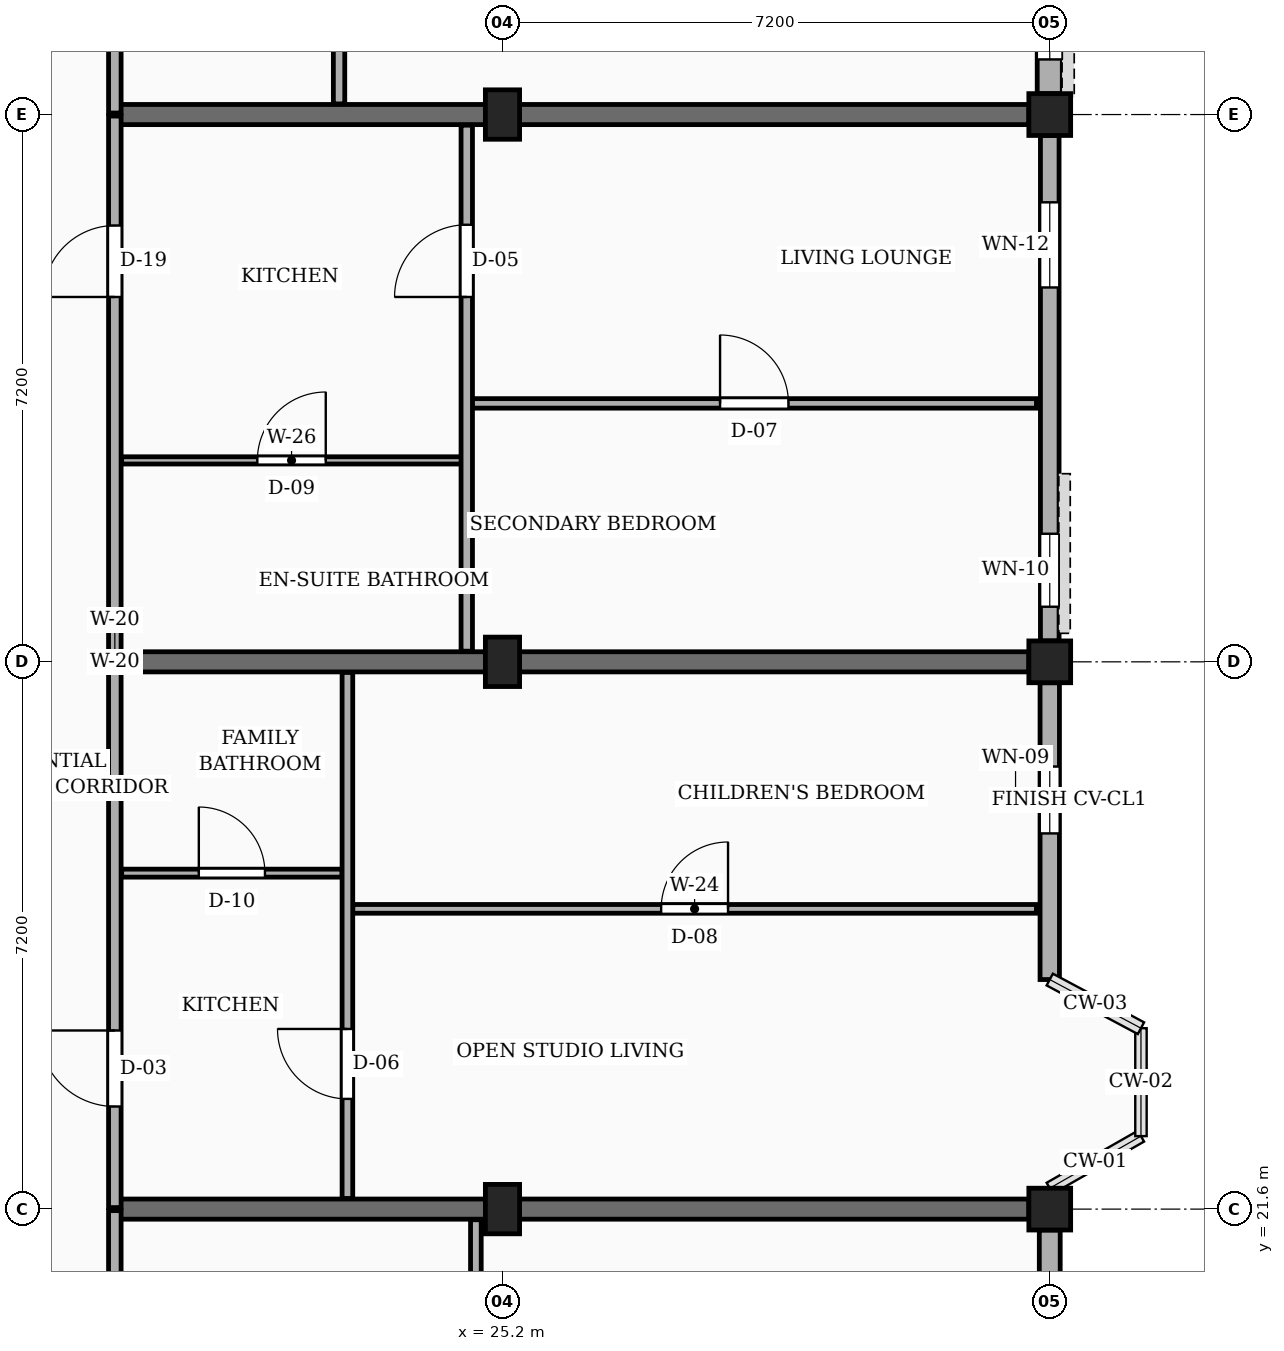
"""IFC4 building model, lengths in metres.
Left out: names, types, materials, properties, quantities, classifications, styles, units other than length and angle.
Written with IfcOpenShell. Run it as: python <this file> out.ifc"""

import sys

from ifc_helpers import new_model, si_unit, direction, frame, frame_2d, origin, origin_2d, place, context, subcontext, project, spatial, rectangle, extrude, element, fill, save


model = new_model("IFC4")
c1 = context("Model", 3, precision=1e-05, world=origin(), true_north=direction((0.0, 1.0)))
c2 = subcontext(c1, "Body", "Model", "MODEL_VIEW")
j1 = project(units=[si_unit("LENGTHUNIT", "METRE"), si_unit("PLANEANGLEUNIT", "RADIAN")], contexts=[c1])
p1 = place(None, origin())
s1 = spatial("IfcSite", under=j1, at=p1, CompositionType="ELEMENT")
p2 = place(p1, origin())
s2 = spatial("IfcBuilding", under=s1, at=p2, CompositionType="ELEMENT")
p3 = place(p2, frame((0.0, 0.0, 10.8)))
s3 = spatial("IfcBuildingStorey", under=s2, at=p3, CompositionType="ELEMENT", Elevation=10.8)
for number, where, z_axis, x_axis in (
    (1, (25.2, 21.6, 0.0), (0.0, 0.0, 1.0), (1.0, 0.0, 0.0)),
    (2, (25.2, 28.8, 0.0), (0.0, 0.0, 1.0), (1.0, 0.0, 0.0)),
    (3, (25.2, 36.0, 0.0), (0.0, 0.0, 1.0), (1.0, 0.0, 0.0)),
):
    element("IfcColumn", number, at=place(p3, frame(where, z_axis=z_axis, x_axis=x_axis)), inside=s3, PredefinedType="COLUMN", context=c2, shape_type="SweptSolid", body=[
        extrude(rectangle(XDim=0.45, YDim=0.65, at=origin_2d()), origin(), (0.0, 0.0, 1.0), 3.15),
    ])
for number, where, z_axis, x_axis in (
    (4, (32.4, 21.6, 0.0), (0.0, 0.0, 1.0), (1.0, 0.0, 0.0)),
    (5, (32.4, 28.8, 0.0), (0.0, 0.0, 1.0), (1.0, 0.0, 0.0)),
    (6, (32.4, 36.0, 0.0), (0.0, 0.0, 1.0), (1.0, 0.0, 0.0)),
):
    element("IfcColumn", number, at=place(p3, frame(where, z_axis=z_axis, x_axis=x_axis)), inside=s3, PredefinedType="COLUMN", context=c2, shape_type="SweptSolid", body=[
        extrude(rectangle(XDim=0.55, YDim=0.55, at=origin_2d()), origin(), (0.0, 0.0, 1.0), 3.15),
    ])
for number, where, z_axis, x_axis in (
    (7, (20.1, 21.6, 0.0), (0.0, 0.0, 1.0), (1.0, 0.0, 0.0)),
    (8, (20.1, 28.8, 0.0), (0.0, 0.0, 1.0), (1.0, 0.0, 0.0)),
    (9, (20.1, 36.0, 0.0), (0.0, 0.0, 1.0), (1.0, 0.0, 0.0)),
):
    element("IfcWall", number, at=place(p3, frame(where, z_axis=z_axis, x_axis=x_axis)), inside=s3, PredefinedType="SOLIDWALL", context=c2, shape_type="SweptSolid", body=[
        extrude(rectangle(XDim=12.025, YDim=0.265, at=frame_2d((6.012, 0.0))), origin(), (0.0, 0.0, 1.0), 2.17),
    ])
p4 = place(p3, frame((32.4, 14.675, 0.0), z_axis=(0.0, 0.0, 1.0), x_axis=(0.0, 1.0, 0.0)))
e10 = element("IfcWall", 10, at=p4, inside=s3, PredefinedType="SOLIDWALL", context=c2, shape_type="SweptSolid", body=[
    extrude(rectangle(XDim=6.65, YDim=0.275, at=frame_2d((3.325, 0.0))), origin(), (0.0, 0.0, 1.0), 2.44),
])
p5 = place(p4, frame((0.45, 0.0, 0.78)))
e11 = element("IfcOpeningElement", 11, at=p5, cuts=e10, PredefinedType="OPENING", context=c2, shape_type="SweptSolid", body=[
    extrude(rectangle(XDim=1.32, YDim=1.15, at=frame_2d((0.66, 0.575))), frame((0.0, 0.147, 0.0), z_axis=(0.0, -1.0, 0.0), x_axis=(1.0, 0.0, 0.0)), (0.0, 0.0, 1.0), 0.295),
])
p6 = place(p4, frame((4.65, 0.0, 0.78)))
e12 = element("IfcOpeningElement", 12, at=p6, cuts=e10, PredefinedType="OPENING", context=c2, shape_type="SweptSolid", body=[
    extrude(rectangle(XDim=0.88, YDim=1.26, at=frame_2d((0.44, 0.63))), frame((0.0, 0.147, 0.0), z_axis=(0.0, -1.0, 0.0), x_axis=(1.0, 0.0, 0.0)), (0.0, 0.0, 1.0), 0.295),
])
p7 = place(p3, frame((32.4, 24.62, 0.0), z_axis=(0.0, 0.0, 1.0), x_axis=(0.0, 1.0, 0.0)))
e13 = element("IfcWall", 13, at=p7, inside=s3, PredefinedType="SOLIDWALL", context=c2, shape_type="SweptSolid", body=[
    extrude(rectangle(XDim=3.905, YDim=0.255, at=frame_2d((1.952, 0.0))), origin(), (0.0, 0.0, 1.0), 2.44),
])
p8 = place(p7, frame((1.923, 0.0, 0.78)))
e14 = element("IfcOpeningElement", 14, at=p8, cuts=e13, PredefinedType="OPENING", context=c2, shape_type="SweptSolid", body=[
    extrude(rectangle(XDim=0.88, YDim=1.26, at=frame_2d((0.44, 0.63))), frame((0.0, 0.137, 0.0), z_axis=(0.0, -1.0, 0.0), x_axis=(1.0, 0.0, 0.0)), (0.0, 0.0, 1.0), 0.275),
])
p9 = place(p3, frame((32.4, 29.075, 0.0), z_axis=(0.0, 0.0, 1.0), x_axis=(0.0, 1.0, 0.0)))
e15 = element("IfcWall", 15, at=p9, inside=s3, PredefinedType="SOLIDWALL", context=c2, shape_type="SweptSolid", body=[
    extrude(rectangle(XDim=6.65, YDim=0.245, at=frame_2d((3.325, 0.0))), origin(), (0.0, 0.0, 1.0), 2.44),
])
p10 = place(p9, frame((0.45, 0.0, 0.78)))
e16 = element("IfcOpeningElement", 16, at=p10, cuts=e15, PredefinedType="OPENING", context=c2, shape_type="SweptSolid", body=[
    extrude(rectangle(XDim=0.96, YDim=1.26, at=frame_2d((0.48, 0.63))), frame((0.0, 0.133, 0.0), z_axis=(0.0, -1.0, 0.0), x_axis=(1.0, 0.0, 0.0)), (0.0, 0.0, 1.0), 0.265),
])
p11 = place(p9, frame((4.65, 0.0, 0.78)))
e17 = element("IfcOpeningElement", 17, at=p11, cuts=e15, PredefinedType="OPENING", context=c2, shape_type="SweptSolid", body=[
    extrude(rectangle(XDim=1.12, YDim=1.26, at=frame_2d((0.56, 0.63))), frame((0.0, 0.133, 0.0), z_axis=(0.0, -1.0, 0.0), x_axis=(1.0, 0.0, 0.0)), (0.0, 0.0, 1.0), 0.265),
])
p12 = place(p3, frame((32.4, 36.275, 0.0), z_axis=(0.0, 0.0, 1.0), x_axis=(0.0, 1.0, 0.0)))
e18 = element("IfcWall", 18, at=p12, inside=s3, PredefinedType="SOLIDWALL", context=c2, shape_type="SweptSolid", body=[
    extrude(rectangle(XDim=6.65, YDim=0.33, at=frame_2d((3.325, 0.0))), origin(), (0.0, 0.0, 1.0), 2.44),
])
p13 = place(p12, frame((0.45, 0.0, 0.78)))
e19 = element("IfcOpeningElement", 19, at=p13, cuts=e18, PredefinedType="OPENING", context=c2, shape_type="SweptSolid", body=[
    extrude(rectangle(XDim=1.12, YDim=1.26, at=frame_2d((0.56, 0.63))), frame((0.0, 0.175, 0.0), z_axis=(0.0, -1.0, 0.0), x_axis=(1.0, 0.0, 0.0)), (0.0, 0.0, 1.0), 0.35),
])
p14 = place(p12, frame((4.65, 0.0, 0.78)))
e20 = element("IfcOpeningElement", 20, at=p14, cuts=e18, PredefinedType="OPENING", context=c2, shape_type="SweptSolid", body=[
    extrude(rectangle(XDim=1.28, YDim=1.26, at=frame_2d((0.64, 0.63))), frame((0.0, 0.175, 0.0), z_axis=(0.0, -1.0, 0.0), x_axis=(1.0, 0.0, 0.0)), (0.0, 0.0, 1.0), 0.35),
])
p15 = place(p3, frame((20.1, 14.42, 0.0), z_axis=(0.0, 0.0, 1.0), x_axis=(0.0, 1.0, 0.0)))
e21 = element("IfcWall", 21, at=p15, inside=s3, PredefinedType="PARTITIONING", context=c2, shape_type="SweptSolid", body=[
    extrude(rectangle(XDim=7.16, YDim=0.165, at=frame_2d((3.58, 0.0))), origin(), (0.0, 0.0, 1.0), 2.305),
])
p16 = place(p15, frame((4.78, 0.0, 0.0)))
e22 = element("IfcOpeningElement", 22, at=p16, cuts=e21, PredefinedType="OPENING", context=c2, shape_type="SweptSolid", body=[
    extrude(rectangle(XDim=1.14, YDim=2.18, at=frame_2d((0.57, 1.09))), frame((0.0, 0.093, 0.0), z_axis=(0.0, -1.0, 0.0), x_axis=(1.0, 0.0, 0.0)), (0.0, 0.0, 1.0), 0.185),
])
p17 = place(p3, frame((20.1, 21.62, 0.0), z_axis=(0.0, 0.0, 1.0), x_axis=(0.0, 1.0, 0.0)))
e23 = element("IfcWall", 23, at=p17, inside=s3, PredefinedType="PARTITIONING", context=c2, shape_type="SweptSolid", body=[
    extrude(rectangle(XDim=7.16, YDim=0.165, at=frame_2d((3.58, 0.0))), origin(), (0.0, 0.0, 1.0), 2.305),
])
p18 = place(p17, frame((1.33, 0.0, 0.0)))
e24 = element("IfcOpeningElement", 24, at=p18, cuts=e23, PredefinedType="OPENING", context=c2, shape_type="SweptSolid", body=[
    extrude(rectangle(XDim=1.0, YDim=2.15, at=frame_2d((0.5, 1.075))), frame((0.0, 0.093, 0.0), z_axis=(0.0, -1.0, 0.0), x_axis=(1.0, 0.0, 0.0)), (0.0, 0.0, 1.0), 0.185),
])
p19 = place(p3, frame((20.1, 28.82, 0.0), z_axis=(0.0, 0.0, 1.0), x_axis=(0.0, 1.0, 0.0)))
e25 = element("IfcWall", 25, at=p19, inside=s3, PredefinedType="PARTITIONING", context=c2, shape_type="SweptSolid", body=[
    extrude(rectangle(XDim=7.16, YDim=0.165, at=frame_2d((3.58, 0.0))), origin(), (0.0, 0.0, 1.0), 2.305),
])
p20 = place(p19, frame((4.78, 0.0, 0.0)))
e26 = element("IfcOpeningElement", 26, at=p20, cuts=e25, PredefinedType="OPENING", context=c2, shape_type="SweptSolid", body=[
    extrude(rectangle(XDim=0.94, YDim=2.12, at=frame_2d((0.47, 1.06))), frame((0.0, 0.093, 0.0), z_axis=(0.0, -1.0, 0.0), x_axis=(1.0, 0.0, 0.0)), (0.0, 0.0, 1.0), 0.185),
])
p21 = place(p3, frame((20.1, 36.02, 0.0), z_axis=(0.0, 0.0, 1.0), x_axis=(0.0, 1.0, 0.0)))
e27 = element("IfcWall", 27, at=p21, inside=s3, PredefinedType="PARTITIONING", context=c2, shape_type="SweptSolid", body=[
    extrude(rectangle(XDim=7.16, YDim=0.165, at=frame_2d((3.58, 0.0))), origin(), (0.0, 0.0, 1.0), 2.305),
])
p22 = place(p21, frame((1.33, 0.0, 0.0)))
e28 = element("IfcOpeningElement", 28, at=p22, cuts=e27, PredefinedType="OPENING", context=c2, shape_type="SweptSolid", body=[
    extrude(rectangle(XDim=1.14, YDim=2.18, at=frame_2d((0.57, 1.09))), frame((0.0, 0.093, 0.0), z_axis=(0.0, -1.0, 0.0), x_axis=(1.0, 0.0, 0.0)), (0.0, 0.0, 1.0), 0.185),
])
p23 = place(p3, frame((24.85, 14.54, 0.0), z_axis=(0.0, 0.0, 1.0), x_axis=(0.0, 1.0, 0.0)))
e29 = element("IfcWall", 29, at=p23, inside=s3, PredefinedType="PARTITIONING", context=c2, shape_type="SweptSolid", body=[
    extrude(rectangle(XDim=6.92, YDim=0.14, at=frame_2d((3.46, 0.0))), origin(), (0.0, 0.0, 1.0), 2.305),
])
p24 = place(p23, frame((4.66, 0.0, 0.0)))
e30 = element("IfcOpeningElement", 30, at=p24, cuts=e29, PredefinedType="OPENING", context=c2, shape_type="SweptSolid", body=[
    extrude(rectangle(XDim=0.95, YDim=2.1, at=frame_2d((0.475, 1.05))), frame((0.0, 0.08, 0.0), z_axis=(0.0, -1.0, 0.0), x_axis=(1.0, 0.0, 0.0)), (0.0, 0.0, 1.0), 0.16),
])
p25 = place(p3, frame((23.23, 25.55, 0.0), z_axis=(0.0, 0.0, 1.0), x_axis=(1.0, 0.0, 0.0)))
e31 = element("IfcWall", 31, at=p25, inside=s3, PredefinedType="PARTITIONING", context=c2, shape_type="SweptSolid", body=[
    extrude(rectangle(XDim=8.995, YDim=0.115, at=frame_2d((4.498, 0.0))), origin(), (0.0, 0.0, 1.0), 2.305),
])
p26 = place(p25, frame((4.058, 0.0, 0.0)))
e32 = element("IfcOpeningElement", 32, at=p26, cuts=e31, PredefinedType="OPENING", context=c2, shape_type="SweptSolid", body=[
    extrude(rectangle(XDim=0.88, YDim=2.08, at=frame_2d((0.44, 1.04))), frame((0.0, 0.067, 0.0), z_axis=(0.0, -1.0, 0.0), x_axis=(1.0, 0.0, 0.0)), (0.0, 0.0, 1.0), 0.135),
])
p27 = place(p3, frame((20.19, 26.02, 0.0), z_axis=(0.0, 0.0, 1.0), x_axis=(1.0, 0.0, 0.0)))
e33 = element("IfcWall", 33, at=p27, inside=s3, PredefinedType="PARTITIONING", context=c2, shape_type="SweptSolid", body=[
    extrude(rectangle(XDim=2.9, YDim=0.105, at=frame_2d((1.45, 0.0))), origin(), (0.0, 0.0, 1.0), 2.305),
])
p28 = place(p27, frame((1.015, 0.0, 0.0)))
e34 = element("IfcOpeningElement", 34, at=p28, cuts=e33, PredefinedType="OPENING", context=c2, shape_type="SweptSolid", body=[
    extrude(rectangle(XDim=0.87, YDim=2.05, at=frame_2d((0.435, 1.025))), frame((0.0, 0.062, 0.0), z_axis=(0.0, -1.0, 0.0), x_axis=(1.0, 0.0, 0.0)), (0.0, 0.0, 1.0), 0.125),
])
p29 = place(p3, frame((23.16, 21.74, 0.0), z_axis=(0.0, 0.0, 1.0), x_axis=(0.0, 1.0, 0.0)))
e35 = element("IfcWall", 35, at=p29, inside=s3, PredefinedType="PARTITIONING", context=c2, shape_type="SweptSolid", body=[
    extrude(rectangle(XDim=6.92, YDim=0.14, at=frame_2d((3.46, 0.0))), origin(), (0.0, 0.0, 1.0), 2.305),
])
p30 = place(p29, frame((1.31, 0.0, 0.0)))
e36 = element("IfcOpeningElement", 36, at=p30, cuts=e35, PredefinedType="OPENING", context=c2, shape_type="SweptSolid", body=[
    extrude(rectangle(XDim=0.92, YDim=2.1, at=frame_2d((0.46, 1.05))), frame((0.0, 0.08, 0.0), z_axis=(0.0, -1.0, 0.0), x_axis=(1.0, 0.0, 0.0)), (0.0, 0.0, 1.0), 0.16),
])
p31 = place(p3, frame((24.8, 32.2, 0.0), z_axis=(0.0, 0.0, 1.0), x_axis=(1.0, 0.0, 0.0)))
e37 = element("IfcWall", 37, at=p31, inside=s3, PredefinedType="PARTITIONING", context=c2, shape_type="SweptSolid", body=[
    extrude(rectangle(XDim=7.425, YDim=0.125, at=frame_2d((3.712, 0.0))), origin(), (0.0, 0.0, 1.0), 2.305),
])
p32 = place(p31, frame((3.262, 0.0, 0.0)))
e38 = element("IfcOpeningElement", 38, at=p32, cuts=e37, PredefinedType="OPENING", context=c2, shape_type="SweptSolid", body=[
    extrude(rectangle(XDim=0.9, YDim=2.1, at=frame_2d((0.45, 1.05))), frame((0.0, 0.073, 0.0), z_axis=(0.0, -1.0, 0.0), x_axis=(1.0, 0.0, 0.0)), (0.0, 0.0, 1.0), 0.145),
])
p33 = place(p3, frame((20.19, 31.45, 0.0), z_axis=(0.0, 0.0, 1.0), x_axis=(1.0, 0.0, 0.0)))
e39 = element("IfcWall", 39, at=p33, inside=s3, PredefinedType="PARTITIONING", context=c2, shape_type="SweptSolid", body=[
    extrude(rectangle(XDim=4.47, YDim=0.095, at=frame_2d((2.235, 0.0))), origin(), (0.0, 0.0, 1.0), 2.305),
])
p34 = place(p33, frame((1.785, 0.0, 0.0)))
e40 = element("IfcOpeningElement", 40, at=p34, cuts=e39, PredefinedType="OPENING", context=c2, shape_type="SweptSolid", body=[
    extrude(rectangle(XDim=0.9, YDim=2.05, at=frame_2d((0.45, 1.025))), frame((0.0, 0.058, 0.0), z_axis=(0.0, -1.0, 0.0), x_axis=(1.0, 0.0, 0.0)), (0.0, 0.0, 1.0), 0.115),
])
p35 = place(p3, frame((24.73, 28.94, 0.0), z_axis=(0.0, 0.0, 1.0), x_axis=(0.0, 1.0, 0.0)))
e41 = element("IfcWall", 41, at=p35, inside=s3, PredefinedType="PARTITIONING", context=c2, shape_type="SweptSolid", body=[
    extrude(rectangle(XDim=6.92, YDim=0.15, at=frame_2d((3.46, 0.0))), origin(), (0.0, 0.0, 1.0), 2.305),
])
p36 = place(p35, frame((4.66, 0.0, 0.0)))
e42 = element("IfcOpeningElement", 42, at=p36, cuts=e41, PredefinedType="OPENING", context=c2, shape_type="SweptSolid", body=[
    extrude(rectangle(XDim=0.95, YDim=2.1, at=frame_2d((0.475, 1.05))), frame((0.0, 0.085, 0.0), z_axis=(0.0, -1.0, 0.0), x_axis=(1.0, 0.0, 0.0)), (0.0, 0.0, 1.0), 0.17),
])
p37 = place(p3, frame((23.05, 36.14, 0.0), z_axis=(0.0, 0.0, 1.0), x_axis=(0.0, 1.0, 0.0)))
e43 = element("IfcWall", 43, at=p37, inside=s3, PredefinedType="PARTITIONING", context=c2, shape_type="SweptSolid", body=[
    extrude(rectangle(XDim=6.92, YDim=0.15, at=frame_2d((3.46, 0.0))), origin(), (0.0, 0.0, 1.0), 2.305),
])
p38 = place(p37, frame((1.31, 0.0, 0.0)))
e44 = element("IfcOpeningElement", 44, at=p38, cuts=e43, PredefinedType="OPENING", context=c2, shape_type="SweptSolid", body=[
    extrude(rectangle(XDim=0.95, YDim=2.1, at=frame_2d((0.475, 1.05))), frame((0.0, 0.085, 0.0), z_axis=(0.0, -1.0, 0.0), x_axis=(1.0, 0.0, 0.0)), (0.0, 0.0, 1.0), 0.17),
])
p39 = place(p8, origin())
e45 = element("IfcWindow", 45, at=p39, inside=s3, PartitioningType="SINGLE_PANEL", PredefinedType="WINDOW", context=c2, shape_type="SweptSolid", body=[
    extrude(rectangle(XDim=0.88, YDim=1.26, at=frame_2d((0.44, 0.63))), frame((0.0, 0.03, 0.0), z_axis=(0.0, -1.0, 0.0), x_axis=(1.0, 0.0, 0.0)), (0.0, 0.0, 1.0), 0.06),
])
fill(e14, e45)
p40 = place(p10, origin())
e46 = element("IfcWindow", 46, at=p40, inside=s3, PartitioningType="SINGLE_PANEL", PredefinedType="WINDOW", context=c2, shape_type="SweptSolid", body=[
    extrude(rectangle(XDim=0.96, YDim=1.26, at=frame_2d((0.48, 0.63))), frame((0.0, 0.03, 0.0), z_axis=(0.0, -1.0, 0.0), x_axis=(1.0, 0.0, 0.0)), (0.0, 0.0, 1.0), 0.06),
])
fill(e16, e46)
p41 = place(p11, origin())
e47 = element("IfcWindow", 47, at=p41, inside=s3, PartitioningType="SINGLE_PANEL", PredefinedType="WINDOW", context=c2, shape_type="SweptSolid", body=[
    extrude(rectangle(XDim=1.12, YDim=1.26, at=frame_2d((0.56, 0.63))), frame((0.0, 0.03, 0.0), z_axis=(0.0, -1.0, 0.0), x_axis=(1.0, 0.0, 0.0)), (0.0, 0.0, 1.0), 0.06),
])
fill(e17, e47)
p42 = place(p13, origin())
e48 = element("IfcWindow", 48, at=p42, inside=s3, PartitioningType="SINGLE_PANEL", PredefinedType="WINDOW", context=c2, shape_type="SweptSolid", body=[
    extrude(rectangle(XDim=1.12, YDim=1.26, at=frame_2d((0.56, 0.63))), frame((0.0, 0.03, 0.0), z_axis=(0.0, -1.0, 0.0), x_axis=(1.0, 0.0, 0.0)), (0.0, 0.0, 1.0), 0.06),
])
fill(e19, e48)
p43 = place(p18, origin())
e49 = element("IfcDoor", 49, at=p43, inside=s3, OperationType="SINGLE_SWING_RIGHT", PredefinedType="DOOR", context=c2, shape_type="SweptSolid", body=[
    extrude(rectangle(XDim=1.0, YDim=2.15, at=frame_2d((0.5, 1.075))), frame((0.0, 0.025, 0.0), z_axis=(0.0, -1.0, 0.0), x_axis=(1.0, 0.0, 0.0)), (0.0, 0.0, 1.0), 0.05),
])
fill(e24, e49)
p44 = place(p20, origin())
e50 = element("IfcDoor", 50, at=p44, inside=s3, OperationType="SINGLE_SWING_LEFT", PredefinedType="DOOR", context=c2, shape_type="SweptSolid", body=[
    extrude(rectangle(XDim=0.94, YDim=2.12, at=frame_2d((0.47, 1.06))), frame((0.0, 0.025, 0.0), z_axis=(0.0, -1.0, 0.0), x_axis=(1.0, 0.0, 0.0)), (0.0, 0.0, 1.0), 0.05),
])
fill(e26, e50)
p45 = place(p26, origin())
e51 = element("IfcDoor", 51, at=p45, inside=s3, OperationType="SINGLE_SWING_RIGHT", PredefinedType="DOOR", context=c2, shape_type="SweptSolid", body=[
    extrude(rectangle(XDim=0.88, YDim=2.08, at=frame_2d((0.44, 1.04))), frame((0.0, 0.025, 0.0), z_axis=(0.0, -1.0, 0.0), x_axis=(1.0, 0.0, 0.0)), (0.0, 0.0, 1.0), 0.05),
])
fill(e32, e51)
p46 = place(p28, origin())
e52 = element("IfcDoor", 52, at=p46, inside=s3, OperationType="SINGLE_SWING_LEFT", PredefinedType="DOOR", context=c2, shape_type="SweptSolid", body=[
    extrude(rectangle(XDim=0.87, YDim=2.05, at=frame_2d((0.435, 1.025))), frame((0.0, 0.025, 0.0), z_axis=(0.0, -1.0, 0.0), x_axis=(1.0, 0.0, 0.0)), (0.0, 0.0, 1.0), 0.05),
])
fill(e34, e52)
p47 = place(p30, origin())
e53 = element("IfcDoor", 53, at=p47, inside=s3, OperationType="SINGLE_SWING_RIGHT", PredefinedType="DOOR", context=c2, shape_type="SweptSolid", body=[
    extrude(rectangle(XDim=0.92, YDim=2.1, at=frame_2d((0.46, 1.05))), frame((0.0, 0.025, 0.0), z_axis=(0.0, -1.0, 0.0), x_axis=(1.0, 0.0, 0.0)), (0.0, 0.0, 1.0), 0.05),
])
fill(e36, e53)
p48 = place(p32, origin())
e54 = element("IfcDoor", 54, at=p48, inside=s3, OperationType="SINGLE_SWING_LEFT", PredefinedType="DOOR", context=c2, shape_type="SweptSolid", body=[
    extrude(rectangle(XDim=0.9, YDim=2.1, at=frame_2d((0.45, 1.05))), frame((0.0, 0.025, 0.0), z_axis=(0.0, -1.0, 0.0), x_axis=(1.0, 0.0, 0.0)), (0.0, 0.0, 1.0), 0.05),
])
fill(e38, e54)
p49 = place(p34, origin())
e55 = element("IfcDoor", 55, at=p49, inside=s3, OperationType="SINGLE_SWING_RIGHT", PredefinedType="DOOR", context=c2, shape_type="SweptSolid", body=[
    extrude(rectangle(XDim=0.9, YDim=2.05, at=frame_2d((0.45, 1.025))), frame((0.0, 0.025, 0.0), z_axis=(0.0, -1.0, 0.0), x_axis=(1.0, 0.0, 0.0)), (0.0, 0.0, 1.0), 0.05),
])
fill(e40, e55)
p50 = place(p36, origin())
e56 = element("IfcDoor", 56, at=p50, inside=s3, OperationType="SINGLE_SWING_LEFT", PredefinedType="DOOR", context=c2, shape_type="SweptSolid", body=[
    extrude(rectangle(XDim=0.95, YDim=2.1, at=frame_2d((0.475, 1.05))), frame((0.0, 0.025, 0.0), z_axis=(0.0, -1.0, 0.0), x_axis=(1.0, 0.0, 0.0)), (0.0, 0.0, 1.0), 0.05),
])
fill(e42, e56)
save(model, sys.argv[1])
